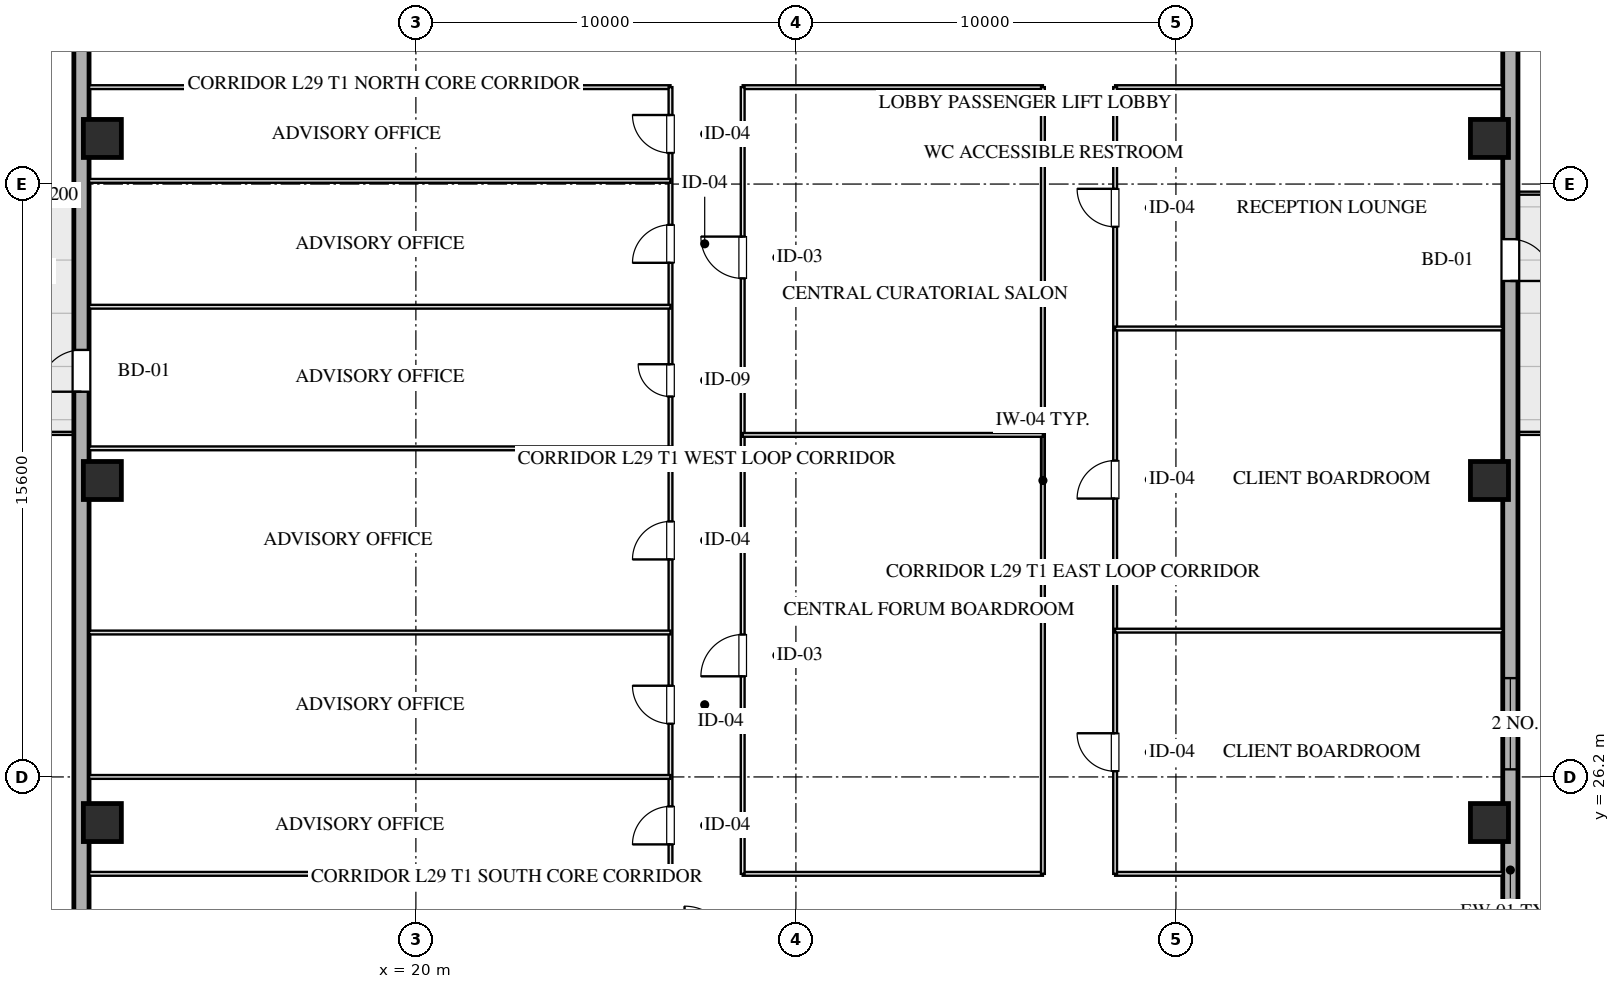
"""IFC4 building model, lengths in metres.
Left out: names, types, materials, properties, quantities, classifications, styles, units other than length and angle.
Written with IfcOpenShell. Run it as: python <this file> out.ifc"""

import sys

from ifc_helpers import new_model, si_unit, direction, frame, frame_2d, origin, origin_2d, place, context, subcontext, project, spatial, rectangle, hollow_rectangle, extrude, element, fill, save


model = new_model("IFC4")
c1 = context("Model", 3, precision=1e-05, world=origin(), true_north=direction((0.0, 1.0)))
c2 = subcontext(c1, "Body", "Model", "MODEL_VIEW")
j1 = project(units=[si_unit("LENGTHUNIT", "METRE"), si_unit("PLANEANGLEUNIT", "RADIAN")], contexts=[c1])
p1 = place(None, origin())
s1 = spatial("IfcSite", under=j1, at=p1, CompositionType="ELEMENT")
p2 = place(p1, origin())
s2 = spatial("IfcBuilding", under=s1, at=p2, CompositionType="ELEMENT")
p3 = place(p2, frame((0.0, 0.0, 113.85)))
s3 = spatial("IfcBuildingStorey", under=s2, at=p3, CompositionType="ELEMENT", Elevation=113.85)
for number, where, z_axis, x_axis in (
    (1, (11.75, 25.0, 0.0), (0.0, 0.0, 1.0), (1.0, 0.0, 0.0)),
    (2, (11.75, 34.0, 0.0), (0.0, 0.0, 1.0), (1.0, 0.0, 0.0)),
    (3, (11.75, 43.0, 0.0), (0.0, 0.0, 1.0), (1.0, 0.0, 0.0)),
    (4, (48.25, 25.0, 0.0), (0.0, 0.0, 1.0), (1.0, 0.0, 0.0)),
    (5, (48.25, 34.0, 0.0), (0.0, 0.0, 1.0), (1.0, 0.0, 0.0)),
    (6, (48.25, 43.0, 0.0), (0.0, 0.0, 1.0), (1.0, 0.0, 0.0)),
):
    element("IfcColumn", number, at=place(p3, frame(where, z_axis=z_axis, x_axis=x_axis)), inside=s3, PredefinedType="COLUMN", context=c2, shape_type="SweptSolid", body=[
        extrude(hollow_rectangle(XDim=1.0, YDim=1.0, WallThickness=0.036, at=origin_2d()), origin(), (0.0, 0.0, 1.0), 3.451),
    ])
p4 = place(p3, frame((11.2, 9.0, 0.0), z_axis=(0.0, 0.0, 1.0), x_axis=(0.0, 1.0, 0.0)))
e7 = element("IfcWall", 7, at=p4, inside=s3, PredefinedType="SOLIDWALL", context=c2, shape_type="SweptSolid", body=[
    extrude(rectangle(XDim=50.0, YDim=0.4, at=frame_2d((25.0, 0.0))), origin(), (0.0, 0.0, 1.0), 2.61),
])
p5 = place(p4, frame((27.336, 0.0, 0.0)))
e8 = element("IfcOpeningElement", 8, at=p5, cuts=e7, PredefinedType="OPENING", context=c2, shape_type="SweptSolid", body=[
    extrude(rectangle(XDim=1.1, YDim=2.15, at=frame_2d((0.55, 1.075))), frame((0.0, 0.21, 0.0), z_axis=(0.0, -1.0, 0.0), x_axis=(1.0, 0.0, 0.0)), (0.0, 0.0, 1.0), 0.42),
])
p6 = place(p3, frame((48.8, 59.0, 0.0), z_axis=(0.0, 0.0, 1.0), x_axis=(0.0, -1.0, 0.0)))
e9 = element("IfcWall", 9, at=p6, inside=s3, PredefinedType="SOLIDWALL", context=c2, shape_type="SweptSolid", body=[
    extrude(rectangle(XDim=50.0, YDim=0.4, at=frame_2d((25.0, 0.0))), origin(), (0.0, 0.0, 1.0), 2.61),
])
p7 = place(p6, frame((30.2, 0.0, 0.75)))
e10 = element("IfcOpeningElement", 10, at=p7, cuts=e9, PredefinedType="OPENING", context=c2, shape_type="SweptSolid", body=[
    extrude(rectangle(XDim=2.4, YDim=1.46, at=frame_2d((1.2, 0.73))), frame((0.0, 0.21, 0.0), z_axis=(0.0, -1.0, 0.0), x_axis=(1.0, 0.0, 0.0)), (0.0, 0.0, 1.0), 0.42),
])
p8 = place(p6, frame((18.65, 0.0, 0.0)))
e11 = element("IfcOpeningElement", 11, at=p8, cuts=e9, PredefinedType="OPENING", context=c2, shape_type="SweptSolid", body=[
    extrude(rectangle(XDim=1.1, YDim=2.15, at=frame_2d((0.55, 1.075))), frame((0.0, 0.21, 0.0), z_axis=(0.0, -1.0, 0.0), x_axis=(1.0, 0.0, 0.0)), (0.0, 0.0, 1.0), 0.42),
])
p9 = place(p3, frame((11.4, 23.65, 0.0), z_axis=(0.0, 0.0, 1.0), x_axis=(1.0, 0.0, 0.0)))
e12 = element("IfcWall", 12, at=p9, inside=s3, PredefinedType="MOVABLE", context=c2, shape_type="SweptSolid", body=[
    extrude(rectangle(XDim=15.3, YDim=0.1, at=frame_2d((7.65, 0.0))), origin(), (0.0, 0.0, 1.0), 3.175),
])
p10 = place(p3, frame((28.6, 23.65, 0.0), z_axis=(0.0, 0.0, 1.0), x_axis=(1.0, 0.0, 0.0)))
e13 = element("IfcWall", 13, at=p10, inside=s3, PredefinedType="MOVABLE", context=c2, shape_type="SweptSolid", body=[
    extrude(rectangle(XDim=7.9, YDim=0.1, at=frame_2d((3.95, 0.0))), origin(), (0.0, 0.0, 1.0), 3.175),
])
p11 = place(p3, frame((38.4, 23.65, 0.0), z_axis=(0.0, 0.0, 1.0), x_axis=(1.0, 0.0, 0.0)))
e14 = element("IfcWall", 14, at=p11, inside=s3, PredefinedType="MOVABLE", context=c2, shape_type="SweptSolid", body=[
    extrude(rectangle(XDim=10.2, YDim=0.1, at=frame_2d((5.1, 0.0))), origin(), (0.0, 0.0, 1.0), 3.175),
])
p12 = place(p3, frame((11.4, 44.35, 0.0), z_axis=(0.0, 0.0, 1.0), x_axis=(1.0, 0.0, 0.0)))
e15 = element("IfcWall", 15, at=p12, inside=s3, PredefinedType="MOVABLE", context=c2, shape_type="SweptSolid", body=[
    extrude(rectangle(XDim=15.3, YDim=0.1, at=frame_2d((7.65, 0.0))), origin(), (0.0, 0.0, 1.0), 3.175),
])
p13 = place(p3, frame((28.6, 44.35, 0.0), z_axis=(0.0, 0.0, 1.0), x_axis=(1.0, 0.0, 0.0)))
e16 = element("IfcWall", 16, at=p13, inside=s3, PredefinedType="MOVABLE", context=c2, shape_type="SweptSolid", body=[
    extrude(rectangle(XDim=7.9, YDim=0.1, at=frame_2d((3.95, 0.0))), origin(), (0.0, 0.0, 1.0), 3.175),
])
p14 = place(p3, frame((38.4, 44.35, 0.0), z_axis=(0.0, 0.0, 1.0), x_axis=(1.0, 0.0, 0.0)))
e17 = element("IfcWall", 17, at=p14, inside=s3, PredefinedType="MOVABLE", context=c2, shape_type="SweptSolid", body=[
    extrude(rectangle(XDim=10.2, YDim=0.1, at=frame_2d((5.1, 0.0))), origin(), (0.0, 0.0, 1.0), 3.175),
])
p15 = place(p3, frame((26.7, 23.65, 0.0), z_axis=(0.0, 0.0, 1.0), x_axis=(0.0, 1.0, 0.0)))
e18 = element("IfcWall", 18, at=p15, inside=s3, PredefinedType="MOVABLE", context=c2, shape_type="SweptSolid", body=[
    extrude(rectangle(XDim=20.7, YDim=0.1, at=frame_2d((10.35, 0.0))), origin(), (0.0, 0.0, 1.0), 3.175),
])
p16 = place(p15, frame((0.775, 0.0, 0.0)))
e19 = element("IfcOpeningElement", 19, at=p16, cuts=e18, PredefinedType="OPENING", context=c2, shape_type="SweptSolid", body=[
    extrude(rectangle(XDim=1.0, YDim=2.05, at=frame_2d((0.5, 1.025))), frame((0.0, 0.06, 0.0), z_axis=(0.0, -1.0, 0.0), x_axis=(1.0, 0.0, 0.0)), (0.0, 0.0, 1.0), 0.12),
])
p17 = place(p15, frame((3.95, 0.0, 0.0)))
e20 = element("IfcOpeningElement", 20, at=p17, cuts=e18, PredefinedType="OPENING", context=c2, shape_type="SweptSolid", body=[
    extrude(rectangle(XDim=1.0, YDim=2.05, at=frame_2d((0.5, 1.025))), frame((0.0, 0.06, 0.0), z_axis=(0.0, -1.0, 0.0), x_axis=(1.0, 0.0, 0.0)), (0.0, 0.0, 1.0), 0.12),
])
p18 = place(p15, frame((8.273, 0.0, 0.0)))
e21 = element("IfcOpeningElement", 21, at=p18, cuts=e18, PredefinedType="OPENING", context=c2, shape_type="SweptSolid", body=[
    extrude(rectangle(XDim=1.0, YDim=2.05, at=frame_2d((0.5, 1.025))), frame((0.0, 0.06, 0.0), z_axis=(0.0, -1.0, 0.0), x_axis=(1.0, 0.0, 0.0)), (0.0, 0.0, 1.0), 0.12),
])
p19 = place(p15, frame((12.559, 0.0, 0.0)))
e22 = element("IfcOpeningElement", 22, at=p19, cuts=e18, PredefinedType="OPENING", context=c2, shape_type="SweptSolid", body=[
    extrude(rectangle(XDim=0.85, YDim=2.05, at=frame_2d((0.425, 1.025))), frame((0.0, 0.06, 0.0), z_axis=(0.0, -1.0, 0.0), x_axis=(1.0, 0.0, 0.0)), (0.0, 0.0, 1.0), 0.12),
])
p20 = place(p15, frame((16.078, 0.0, 0.0)))
e23 = element("IfcOpeningElement", 23, at=p20, cuts=e18, PredefinedType="OPENING", context=c2, shape_type="SweptSolid", body=[
    extrude(rectangle(XDim=1.0, YDim=2.05, at=frame_2d((0.5, 1.025))), frame((0.0, 0.06, 0.0), z_axis=(0.0, -1.0, 0.0), x_axis=(1.0, 0.0, 0.0)), (0.0, 0.0, 1.0), 0.12),
])
p21 = place(p15, frame((18.967, 0.0, 0.0)))
e24 = element("IfcOpeningElement", 24, at=p21, cuts=e18, PredefinedType="OPENING", context=c2, shape_type="SweptSolid", body=[
    extrude(rectangle(XDim=1.0, YDim=2.05, at=frame_2d((0.5, 1.025))), frame((0.0, 0.06, 0.0), z_axis=(0.0, -1.0, 0.0), x_axis=(1.0, 0.0, 0.0)), (0.0, 0.0, 1.0), 0.12),
])
p22 = place(p3, frame((28.6, 23.65, 0.0), z_axis=(0.0, 0.0, 1.0), x_axis=(0.0, 1.0, 0.0)))
e25 = element("IfcWall", 25, at=p22, inside=s3, PredefinedType="MOVABLE", context=c2, shape_type="SweptSolid", body=[
    extrude(rectangle(XDim=20.7, YDim=0.1, at=frame_2d((10.35, 0.0))), origin(), (0.0, 0.0, 1.0), 3.175),
])
p23 = place(p22, frame((5.198, 0.0, 0.0)))
e26 = element("IfcOpeningElement", 26, at=p23, cuts=e25, PredefinedType="OPENING", context=c2, shape_type="SweptSolid", body=[
    extrude(rectangle(XDim=1.1, YDim=2.05, at=frame_2d((0.55, 1.025))), frame((0.0, 0.06, 0.0), z_axis=(0.0, -1.0, 0.0), x_axis=(1.0, 0.0, 0.0)), (0.0, 0.0, 1.0), 0.12),
])
p24 = place(p22, frame((15.667, 0.0, 0.0)))
e27 = element("IfcOpeningElement", 27, at=p24, cuts=e25, PredefinedType="OPENING", context=c2, shape_type="SweptSolid", body=[
    extrude(rectangle(XDim=1.1, YDim=2.05, at=frame_2d((0.55, 1.025))), frame((0.0, 0.06, 0.0), z_axis=(0.0, -1.0, 0.0), x_axis=(1.0, 0.0, 0.0)), (0.0, 0.0, 1.0), 0.12),
])
p25 = place(p3, frame((36.5, 23.65, 0.0), z_axis=(0.0, 0.0, 1.0), x_axis=(0.0, 1.0, 0.0)))
e28 = element("IfcWall", 28, at=p25, inside=s3, PredefinedType="MOVABLE", context=c2, shape_type="SweptSolid", body=[
    extrude(rectangle(XDim=20.7, YDim=0.1, at=frame_2d((10.35, 0.0))), origin(), (0.0, 0.0, 1.0), 3.175),
])
p26 = place(p3, frame((38.4, 23.65, 0.0), z_axis=(0.0, 0.0, 1.0), x_axis=(0.0, 1.0, 0.0)))
e29 = element("IfcWall", 29, at=p26, inside=s3, PredefinedType="MOVABLE", context=c2, shape_type="SweptSolid", body=[
    extrude(rectangle(XDim=20.7, YDim=0.1, at=frame_2d((10.35, 0.0))), origin(), (0.0, 0.0, 1.0), 3.175),
])
p27 = place(p26, frame((2.699, 0.0, 0.0)))
e30 = element("IfcOpeningElement", 30, at=p27, cuts=e29, PredefinedType="OPENING", context=c2, shape_type="SweptSolid", body=[
    extrude(rectangle(XDim=1.0, YDim=2.05, at=frame_2d((0.5, 1.025))), frame((0.0, 0.06, 0.0), z_axis=(0.0, -1.0, 0.0), x_axis=(1.0, 0.0, 0.0)), (0.0, 0.0, 1.0), 0.12),
])
p28 = place(p26, frame((9.875, 0.0, 0.0)))
e31 = element("IfcOpeningElement", 31, at=p28, cuts=e29, PredefinedType="OPENING", context=c2, shape_type="SweptSolid", body=[
    extrude(rectangle(XDim=1.0, YDim=2.05, at=frame_2d((0.5, 1.025))), frame((0.0, 0.06, 0.0), z_axis=(0.0, -1.0, 0.0), x_axis=(1.0, 0.0, 0.0)), (0.0, 0.0, 1.0), 0.12),
])
p29 = place(p26, frame((17.025, 0.0, 0.0)))
e32 = element("IfcOpeningElement", 32, at=p29, cuts=e29, PredefinedType="OPENING", context=c2, shape_type="SweptSolid", body=[
    extrude(rectangle(XDim=1.0, YDim=2.05, at=frame_2d((0.5, 1.025))), frame((0.0, 0.06, 0.0), z_axis=(0.0, -1.0, 0.0), x_axis=(1.0, 0.0, 0.0)), (0.0, 0.0, 1.0), 0.12),
])
p30 = place(p3, frame((28.6, 35.2, 0.0), z_axis=(0.0, 0.0, 1.0), x_axis=(1.0, 0.0, 0.0)))
e33 = element("IfcWall", 33, at=p30, inside=s3, PredefinedType="MOVABLE", context=c2, shape_type="SweptSolid", body=[
    extrude(rectangle(XDim=7.9, YDim=0.1, at=frame_2d((3.95, 0.0))), origin(), (0.0, 0.0, 1.0), 3.175),
])
for number, where, z_axis, x_axis in (
    (34, (11.4, 26.2, 0.0), (0.0, 0.0, 1.0), (1.0, 0.0, 0.0)),
    (35, (11.4, 30.0, 0.0), (0.0, 0.0, 1.0), (1.0, 0.0, 0.0)),
    (36, (11.4, 34.846, 0.0), (0.0, 0.0, 1.0), (1.0, 0.0, 0.0)),
    (37, (11.4, 38.572, 0.0), (0.0, 0.0, 1.0), (1.0, 0.0, 0.0)),
    (38, (11.4, 41.884, 0.0), (0.0, 0.0, 1.0), (1.0, 0.0, 0.0)),
):
    element("IfcWall", number, at=place(p3, frame(where, z_axis=z_axis, x_axis=x_axis)), inside=s3, PredefinedType="MOVABLE", context=c2, shape_type="SweptSolid", body=[
        extrude(rectangle(XDim=15.3, YDim=0.1, at=frame_2d((7.65, 0.0))), origin(), (0.0, 0.0, 1.0), 3.175),
    ])
for number, where, z_axis, x_axis in (
    (39, (38.4, 30.049, 0.0), (0.0, 0.0, 1.0), (1.0, 0.0, 0.0)),
    (40, (38.4, 38.0, 0.0), (0.0, 0.0, 1.0), (1.0, 0.0, 0.0)),
):
    element("IfcWall", number, at=place(p3, frame(where, z_axis=z_axis, x_axis=x_axis)), inside=s3, PredefinedType="MOVABLE", context=c2, shape_type="SweptSolid", body=[
        extrude(rectangle(XDim=10.2, YDim=0.1, at=frame_2d((5.1, 0.0))), origin(), (0.0, 0.0, 1.0), 3.175),
    ])
p31 = place(p7, origin())
e41 = element("IfcWindow", 41, at=p31, inside=s3, PartitioningType="TRIPLE_PANEL_VERTICAL", PredefinedType="WINDOW", context=c2, shape_type="SweptSolid", body=[
    extrude(rectangle(XDim=2.4, YDim=1.46, at=frame_2d((1.2, 0.73))), frame((0.0, 0.03, 0.0), z_axis=(0.0, -1.0, 0.0), x_axis=(1.0, 0.0, 0.0)), (0.0, 0.0, 1.0), 0.06),
])
fill(e10, e41)
p32 = place(p5, origin())
e42 = element("IfcDoor", 42, at=p32, inside=s3, OperationType="SINGLE_SWING_LEFT", PredefinedType="DOOR", context=c2, shape_type="SweptSolid", body=[
    extrude(rectangle(XDim=1.1, YDim=2.15, at=frame_2d((0.55, 1.075))), frame((0.0, 0.025, 0.0), z_axis=(0.0, -1.0, 0.0), x_axis=(1.0, 0.0, 0.0)), (0.0, 0.0, 1.0), 0.05),
])
fill(e8, e42)
p33 = place(p8, origin())
e43 = element("IfcDoor", 43, at=p33, inside=s3, OperationType="SINGLE_SWING_RIGHT", PredefinedType="DOOR", context=c2, shape_type="SweptSolid", body=[
    extrude(rectangle(XDim=1.1, YDim=2.15, at=frame_2d((0.55, 1.075))), frame((0.0, 0.025, 0.0), z_axis=(0.0, -1.0, 0.0), x_axis=(1.0, 0.0, 0.0)), (0.0, 0.0, 1.0), 0.05),
])
fill(e11, e43)
p34 = place(p16, origin())
e44 = element("IfcDoor", 44, at=p34, inside=s3, OperationType="SINGLE_SWING_LEFT", PredefinedType="DOOR", context=c2, shape_type="SweptSolid", body=[
    extrude(rectangle(XDim=1.0, YDim=2.05, at=frame_2d((0.5, 1.025))), frame((0.0, 0.025, 0.0), z_axis=(0.0, -1.0, 0.0), x_axis=(1.0, 0.0, 0.0)), (0.0, 0.0, 1.0), 0.05),
])
fill(e19, e44)
p35 = place(p17, origin())
e45 = element("IfcDoor", 45, at=p35, inside=s3, OperationType="SINGLE_SWING_RIGHT", PredefinedType="DOOR", context=c2, shape_type="SweptSolid", body=[
    extrude(rectangle(XDim=1.0, YDim=2.05, at=frame_2d((0.5, 1.025))), frame((0.0, 0.025, 0.0), z_axis=(0.0, -1.0, 0.0), x_axis=(1.0, 0.0, 0.0)), (0.0, 0.0, 1.0), 0.05),
])
fill(e20, e45)
p36 = place(p18, origin())
e46 = element("IfcDoor", 46, at=p36, inside=s3, OperationType="SINGLE_SWING_LEFT", PredefinedType="DOOR", context=c2, shape_type="SweptSolid", body=[
    extrude(rectangle(XDim=1.0, YDim=2.05, at=frame_2d((0.5, 1.025))), frame((0.0, 0.025, 0.0), z_axis=(0.0, -1.0, 0.0), x_axis=(1.0, 0.0, 0.0)), (0.0, 0.0, 1.0), 0.05),
])
fill(e21, e46)
p37 = place(p19, origin())
e47 = element("IfcDoor", 47, at=p37, inside=s3, OperationType="SINGLE_SWING_RIGHT", PredefinedType="DOOR", context=c2, shape_type="SweptSolid", body=[
    extrude(rectangle(XDim=0.85, YDim=2.05, at=frame_2d((0.425, 1.025))), frame((0.0, 0.025, 0.0), z_axis=(0.0, -1.0, 0.0), x_axis=(1.0, 0.0, 0.0)), (0.0, 0.0, 1.0), 0.05),
])
fill(e22, e47)
p38 = place(p20, origin())
e48 = element("IfcDoor", 48, at=p38, inside=s3, OperationType="SINGLE_SWING_LEFT", PredefinedType="DOOR", context=c2, shape_type="SweptSolid", body=[
    extrude(rectangle(XDim=1.0, YDim=2.05, at=frame_2d((0.5, 1.025))), frame((0.0, 0.025, 0.0), z_axis=(0.0, -1.0, 0.0), x_axis=(1.0, 0.0, 0.0)), (0.0, 0.0, 1.0), 0.05),
])
fill(e23, e48)
p39 = place(p21, origin())
e49 = element("IfcDoor", 49, at=p39, inside=s3, OperationType="SINGLE_SWING_RIGHT", PredefinedType="DOOR", context=c2, shape_type="SweptSolid", body=[
    extrude(rectangle(XDim=1.0, YDim=2.05, at=frame_2d((0.5, 1.025))), frame((0.0, 0.025, 0.0), z_axis=(0.0, -1.0, 0.0), x_axis=(1.0, 0.0, 0.0)), (0.0, 0.0, 1.0), 0.05),
])
fill(e24, e49)
p40 = place(p23, origin())
e50 = element("IfcDoor", 50, at=p40, inside=s3, OperationType="SINGLE_SWING_LEFT", PredefinedType="DOOR", context=c2, shape_type="SweptSolid", body=[
    extrude(rectangle(XDim=1.1, YDim=2.05, at=frame_2d((0.55, 1.025))), frame((0.0, 0.025, 0.0), z_axis=(0.0, -1.0, 0.0), x_axis=(1.0, 0.0, 0.0)), (0.0, 0.0, 1.0), 0.05),
])
fill(e26, e50)
p41 = place(p24, origin())
e51 = element("IfcDoor", 51, at=p41, inside=s3, OperationType="SINGLE_SWING_RIGHT", PredefinedType="DOOR", context=c2, shape_type="SweptSolid", body=[
    extrude(rectangle(XDim=1.1, YDim=2.05, at=frame_2d((0.55, 1.025))), frame((0.0, 0.025, 0.0), z_axis=(0.0, -1.0, 0.0), x_axis=(1.0, 0.0, 0.0)), (0.0, 0.0, 1.0), 0.05),
])
fill(e27, e51)
p42 = place(p27, origin())
e52 = element("IfcDoor", 52, at=p42, inside=s3, OperationType="SINGLE_SWING_RIGHT", PredefinedType="DOOR", context=c2, shape_type="SweptSolid", body=[
    extrude(rectangle(XDim=1.0, YDim=2.05, at=frame_2d((0.5, 1.025))), frame((0.0, 0.025, 0.0), z_axis=(0.0, -1.0, 0.0), x_axis=(1.0, 0.0, 0.0)), (0.0, 0.0, 1.0), 0.05),
])
fill(e30, e52)
p43 = place(p28, origin())
e53 = element("IfcDoor", 53, at=p43, inside=s3, OperationType="SINGLE_SWING_LEFT", PredefinedType="DOOR", context=c2, shape_type="SweptSolid", body=[
    extrude(rectangle(XDim=1.0, YDim=2.05, at=frame_2d((0.5, 1.025))), frame((0.0, 0.025, 0.0), z_axis=(0.0, -1.0, 0.0), x_axis=(1.0, 0.0, 0.0)), (0.0, 0.0, 1.0), 0.05),
])
fill(e31, e53)
p44 = place(p29, origin())
e54 = element("IfcDoor", 54, at=p44, inside=s3, OperationType="SINGLE_SWING_RIGHT", PredefinedType="DOOR", context=c2, shape_type="SweptSolid", body=[
    extrude(rectangle(XDim=1.0, YDim=2.05, at=frame_2d((0.5, 1.025))), frame((0.0, 0.025, 0.0), z_axis=(0.0, -1.0, 0.0), x_axis=(1.0, 0.0, 0.0)), (0.0, 0.0, 1.0), 0.05),
])
fill(e32, e54)
save(model, sys.argv[1])
